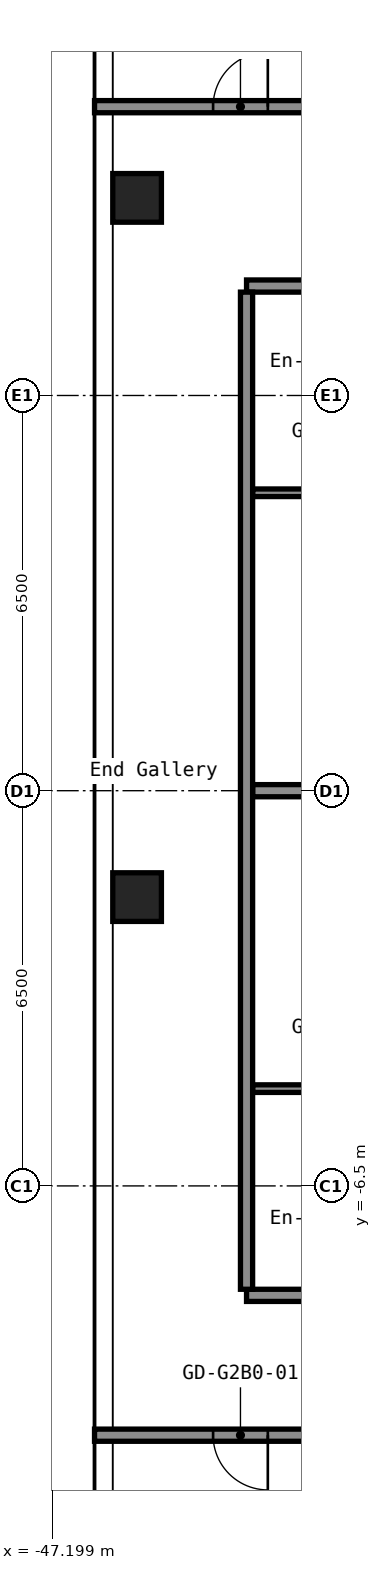
"""IFC4 building model, lengths in metres.
Left out: names, types, materials, properties, quantities, classifications, styles, units other than length and angle.
Written with IfcOpenShell. Run it as: python <this file> out.ifc"""

import sys

from ifc_helpers import new_model, si_unit, direction, frame, frame_2d, origin, origin_2d, place, context, subcontext, project, spatial, rectangle, hollow_rectangle, extrude, element, fill, save


model = new_model("IFC4")
c1 = context("Model", 3, precision=1e-05, world=origin(), true_north=direction((0.0, 1.0)))
c2 = subcontext(c1, "Body", "Model", "MODEL_VIEW")
j1 = project(units=[si_unit("LENGTHUNIT", "METRE"), si_unit("PLANEANGLEUNIT", "RADIAN")], contexts=[c1])
p1 = place(None, origin())
s1 = spatial("IfcSite", under=j1, at=p1, CompositionType="ELEMENT")
p2 = place(p1, origin())
s2 = spatial("IfcBuilding", under=s1, at=p2, CompositionType="ELEMENT")
p3 = place(p2, frame((0.0, 0.0, 78.6)))
s3 = spatial("IfcBuildingStorey", under=s2, at=p3, CompositionType="ELEMENT", Elevation=78.6)
for number, where, z_axis, x_axis in (
    (1, (-45.8, -1.75, 0.0), (0.0, 0.0, 1.0), (1.0, 0.0, 0.0)),
    (2, (-45.8, 9.75, 0.0), (0.0, 0.0, 1.0), (1.0, 0.0, 0.0)),
):
    element("IfcColumn", number, at=place(p3, frame(where, z_axis=z_axis, x_axis=x_axis)), inside=s3, PredefinedType="COLUMN", context=c2, shape_type="SweptSolid", body=[
        extrude(hollow_rectangle(XDim=0.8, YDim=0.8, WallThickness=0.032, at=origin_2d()), origin(), (0.0, 0.0, 1.0), 2.8),
    ])
p4 = place(p3, frame((-46.5, -10.6, 0.0), z_axis=(0.0, 0.0, 1.0), x_axis=(1.0, 0.0, 0.0)))
e3 = element("IfcWall", 3, at=p4, inside=s3, PredefinedType="PARTITIONING", context=c2, shape_type="SweptSolid", body=[
    extrude(rectangle(XDim=29.7, YDim=0.2, at=frame_2d((14.85, 0.0))), origin(), (0.0, 0.0, 1.0), 2.8),
])
p5 = place(p4, frame((1.95, 0.0, 0.0)))
e4 = element("IfcOpeningElement", 4, at=p5, cuts=e3, PredefinedType="OPENING", context=c2, shape_type="SweptSolid", body=[
    extrude(rectangle(XDim=0.9, YDim=2.1, at=frame_2d((0.45, 1.05))), frame((0.0, 0.11, 0.0), z_axis=(0.0, -1.0, 0.0), x_axis=(1.0, 0.0, 0.0)), (0.0, 0.0, 1.0), 0.22),
])
p6 = place(p4, frame((6.57, 0.0, 0.0)))
e5 = element("IfcOpeningElement", 5, at=p6, cuts=e3, PredefinedType="OPENING", context=c2, shape_type="SweptSolid", body=[
    extrude(rectangle(XDim=0.9, YDim=2.1, at=frame_2d((0.45, 1.05))), frame((0.0, 0.11, 0.0), z_axis=(0.0, -1.0, 0.0), x_axis=(1.0, 0.0, 0.0)), (0.0, 0.0, 1.0), 0.22),
])
p7 = place(p4, frame((10.77, 0.0, 0.0)))
e6 = element("IfcOpeningElement", 6, at=p7, cuts=e3, PredefinedType="OPENING", context=c2, shape_type="SweptSolid", body=[
    extrude(rectangle(XDim=0.9, YDim=2.1, at=frame_2d((0.45, 1.05))), frame((0.0, 0.11, 0.0), z_axis=(0.0, -1.0, 0.0), x_axis=(1.0, 0.0, 0.0)), (0.0, 0.0, 1.0), 0.22),
])
p8 = place(p4, frame((14.72, 0.0, 0.0)))
e7 = element("IfcOpeningElement", 7, at=p8, cuts=e3, PredefinedType="OPENING", context=c2, shape_type="SweptSolid", body=[
    extrude(rectangle(XDim=0.9, YDim=2.1, at=frame_2d((0.45, 1.05))), frame((0.0, 0.11, 0.0), z_axis=(0.0, -1.0, 0.0), x_axis=(1.0, 0.0, 0.0)), (0.0, 0.0, 1.0), 0.22),
])
p9 = place(p4, frame((18.92, 0.0, 0.0)))
e8 = element("IfcOpeningElement", 8, at=p9, cuts=e3, PredefinedType="OPENING", context=c2, shape_type="SweptSolid", body=[
    extrude(rectangle(XDim=0.9, YDim=2.1, at=frame_2d((0.45, 1.05))), frame((0.0, 0.11, 0.0), z_axis=(0.0, -1.0, 0.0), x_axis=(1.0, 0.0, 0.0)), (0.0, 0.0, 1.0), 0.22),
])
p10 = place(p4, frame((25.0, 0.0, 0.0)))
e9 = element("IfcOpeningElement", 9, at=p10, cuts=e3, PredefinedType="OPENING", context=c2, shape_type="SweptSolid", body=[
    extrude(rectangle(XDim=1.0, YDim=2.1, at=frame_2d((0.5, 1.05))), frame((0.0, 0.11, 0.0), z_axis=(0.0, -1.0, 0.0), x_axis=(1.0, 0.0, 0.0)), (0.0, 0.0, 1.0), 0.22),
])
p11 = place(p3, frame((-44.0, -8.3, 0.0), z_axis=(0.0, 0.0, 1.0), x_axis=(1.0, 0.0, 0.0)))
e10 = element("IfcWall", 10, at=p11, inside=s3, PredefinedType="PARTITIONING", context=c2, shape_type="SweptSolid", body=[
    extrude(rectangle(XDim=10.4, YDim=0.2, at=frame_2d((5.2, 0.0))), origin(), (0.0, 0.0, 1.0), 2.8),
])
p12 = place(p11, frame((6.35, 0.0, 0.0)))
e11 = element("IfcOpeningElement", 11, at=p12, cuts=e10, PredefinedType="OPENING", context=c2, shape_type="SweptSolid", body=[
    extrude(rectangle(XDim=1.0, YDim=2.1, at=frame_2d((0.5, 1.05))), frame((0.0, 0.11, 0.0), z_axis=(0.0, -1.0, 0.0), x_axis=(1.0, 0.0, 0.0)), (0.0, 0.0, 1.0), 0.22),
])
p13 = place(p3, frame((-43.9, -4.9, 0.0), z_axis=(0.0, 0.0, 1.0), x_axis=(1.0, 0.0, 0.0)))
e12 = element("IfcWall", 12, at=p13, inside=s3, PredefinedType="PARTITIONING", context=c2, shape_type="SweptSolid", body=[
    extrude(rectangle(XDim=3.237, YDim=0.125, at=frame_2d((1.619, 0.0))), origin(), (0.0, 0.0, 1.0), 2.8),
])
p14 = place(p13, frame((1.2, 0.0, 0.0)))
e13 = element("IfcOpeningElement", 13, at=p14, cuts=e12, PredefinedType="OPENING", context=c2, shape_type="SweptSolid", body=[
    extrude(rectangle(XDim=0.8, YDim=2.1, at=frame_2d((0.4, 1.05))), frame((0.0, 0.073, 0.0), z_axis=(0.0, -1.0, 0.0), x_axis=(1.0, 0.0, 0.0)), (0.0, 0.0, 1.0), 0.145),
])
p15 = place(p3, frame((-43.9, 0.0, 0.0), z_axis=(0.0, 0.0, 1.0), x_axis=(1.0, 0.0, 0.0)))
e14 = element("IfcWall", 14, at=p15, inside=s3, PredefinedType="PARTITIONING", context=c2, shape_type="SweptSolid", body=[
    extrude(rectangle(XDim=10.3, YDim=0.2, at=frame_2d((5.15, 0.0))), origin(), (0.0, 0.0, 1.0), 2.8),
])
p16 = place(p3, frame((-43.9, 4.9, 0.0), z_axis=(0.0, 0.0, 1.0), x_axis=(1.0, 0.0, 0.0)))
e15 = element("IfcWall", 15, at=p16, inside=s3, PredefinedType="PARTITIONING", context=c2, shape_type="SweptSolid", body=[
    extrude(rectangle(XDim=3.237, YDim=0.125, at=frame_2d((1.619, 0.0))), origin(), (0.0, 0.0, 1.0), 2.8),
])
p17 = place(p16, frame((1.2, 0.0, 0.0)))
e16 = element("IfcOpeningElement", 16, at=p17, cuts=e15, PredefinedType="OPENING", context=c2, shape_type="SweptSolid", body=[
    extrude(rectangle(XDim=0.8, YDim=2.1, at=frame_2d((0.4, 1.05))), frame((0.0, 0.073, 0.0), z_axis=(0.0, -1.0, 0.0), x_axis=(1.0, 0.0, 0.0)), (0.0, 0.0, 1.0), 0.145),
])
p18 = place(p3, frame((-44.0, 8.3, 0.0), z_axis=(0.0, 0.0, 1.0), x_axis=(1.0, 0.0, 0.0)))
e17 = element("IfcWall", 17, at=p18, inside=s3, PredefinedType="PARTITIONING", context=c2, shape_type="SweptSolid", body=[
    extrude(rectangle(XDim=10.4, YDim=0.2, at=frame_2d((5.2, 0.0))), origin(), (0.0, 0.0, 1.0), 2.8),
])
p19 = place(p18, frame((6.35, 0.0, 0.0)))
e18 = element("IfcOpeningElement", 18, at=p19, cuts=e17, PredefinedType="OPENING", context=c2, shape_type="SweptSolid", body=[
    extrude(rectangle(XDim=1.0, YDim=2.1, at=frame_2d((0.5, 1.05))), frame((0.0, 0.11, 0.0), z_axis=(0.0, -1.0, 0.0), x_axis=(1.0, 0.0, 0.0)), (0.0, 0.0, 1.0), 0.22),
])
p20 = place(p3, frame((-46.5, 11.25, 0.0), z_axis=(0.0, 0.0, 1.0), x_axis=(1.0, 0.0, 0.0)))
e19 = element("IfcWall", 19, at=p20, inside=s3, PredefinedType="PARTITIONING", context=c2, shape_type="SweptSolid", body=[
    extrude(rectangle(XDim=29.7, YDim=0.2, at=frame_2d((14.85, 0.0))), origin(), (0.0, 0.0, 1.0), 2.8),
])
p21 = place(p20, frame((1.95, 0.0, 0.0)))
e20 = element("IfcOpeningElement", 20, at=p21, cuts=e19, PredefinedType="OPENING", context=c2, shape_type="SweptSolid", body=[
    extrude(rectangle(XDim=0.9, YDim=2.1, at=frame_2d((0.45, 1.05))), frame((0.0, 0.11, 0.0), z_axis=(0.0, -1.0, 0.0), x_axis=(1.0, 0.0, 0.0)), (0.0, 0.0, 1.0), 0.22),
])
p22 = place(p20, frame((6.4, 0.0, 0.0)))
e21 = element("IfcOpeningElement", 21, at=p22, cuts=e19, PredefinedType="OPENING", context=c2, shape_type="SweptSolid", body=[
    extrude(rectangle(XDim=1.0, YDim=2.1, at=frame_2d((0.5, 1.05))), frame((0.0, 0.11, 0.0), z_axis=(0.0, -1.0, 0.0), x_axis=(1.0, 0.0, 0.0)), (0.0, 0.0, 1.0), 0.22),
])
p23 = place(p20, frame((15.75, 0.0, 0.0)))
e22 = element("IfcOpeningElement", 22, at=p23, cuts=e19, PredefinedType="OPENING", context=c2, shape_type="SweptSolid", body=[
    extrude(rectangle(XDim=1.0, YDim=2.1, at=frame_2d((0.5, 1.05))), frame((0.0, 0.11, 0.0), z_axis=(0.0, -1.0, 0.0), x_axis=(1.0, 0.0, 0.0)), (0.0, 0.0, 1.0), 0.22),
])
p24 = place(p20, frame((17.45, 0.0, 0.0)))
e23 = element("IfcOpeningElement", 23, at=p24, cuts=e19, PredefinedType="OPENING", context=c2, shape_type="SweptSolid", body=[
    extrude(rectangle(XDim=1.0, YDim=2.1, at=frame_2d((0.5, 1.05))), frame((0.0, 0.11, 0.0), z_axis=(0.0, -1.0, 0.0), x_axis=(1.0, 0.0, 0.0)), (0.0, 0.0, 1.0), 0.22),
])
p25 = place(p20, frame((26.8, 0.0, 0.0)))
e24 = element("IfcOpeningElement", 24, at=p25, cuts=e19, PredefinedType="OPENING", context=c2, shape_type="SweptSolid", body=[
    extrude(rectangle(XDim=1.0, YDim=2.1, at=frame_2d((0.5, 1.05))), frame((0.0, 0.11, 0.0), z_axis=(0.0, -1.0, 0.0), x_axis=(1.0, 0.0, 0.0)), (0.0, 0.0, 1.0), 0.22),
])
p26 = place(p3, frame((-44.0, -8.2, 0.0), z_axis=(0.0, 0.0, 1.0), x_axis=(0.0, 1.0, 0.0)))
e25 = element("IfcWall", 25, at=p26, inside=s3, PredefinedType="PARTITIONING", context=c2, shape_type="SweptSolid", body=[
    extrude(rectangle(XDim=16.4, YDim=0.2, at=frame_2d((8.2, 0.0))), origin(), (0.0, 0.0, 1.0), 2.8),
])
p27 = place(p5, origin())
e26 = element("IfcDoor", 26, at=p27, inside=s3, OperationType="SINGLE_SWING_RIGHT", PredefinedType="DOOR", context=c2, shape_type="SweptSolid", body=[
    extrude(rectangle(XDim=0.9, YDim=2.1, at=frame_2d((0.45, 1.05))), frame((0.0, 0.025, 0.0), z_axis=(0.0, -1.0, 0.0), x_axis=(1.0, 0.0, 0.0)), (0.0, 0.0, 1.0), 0.05),
])
fill(e4, e26)
p28 = place(p21, origin())
e27 = element("IfcDoor", 27, at=p28, inside=s3, OperationType="SINGLE_SWING_LEFT", PredefinedType="DOOR", context=c2, shape_type="SweptSolid", body=[
    extrude(rectangle(XDim=0.9, YDim=2.1, at=frame_2d((0.45, 1.05))), frame((0.0, 0.025, 0.0), z_axis=(0.0, -1.0, 0.0), x_axis=(1.0, 0.0, 0.0)), (0.0, 0.0, 1.0), 0.05),
])
fill(e20, e27)
save(model, sys.argv[1])
